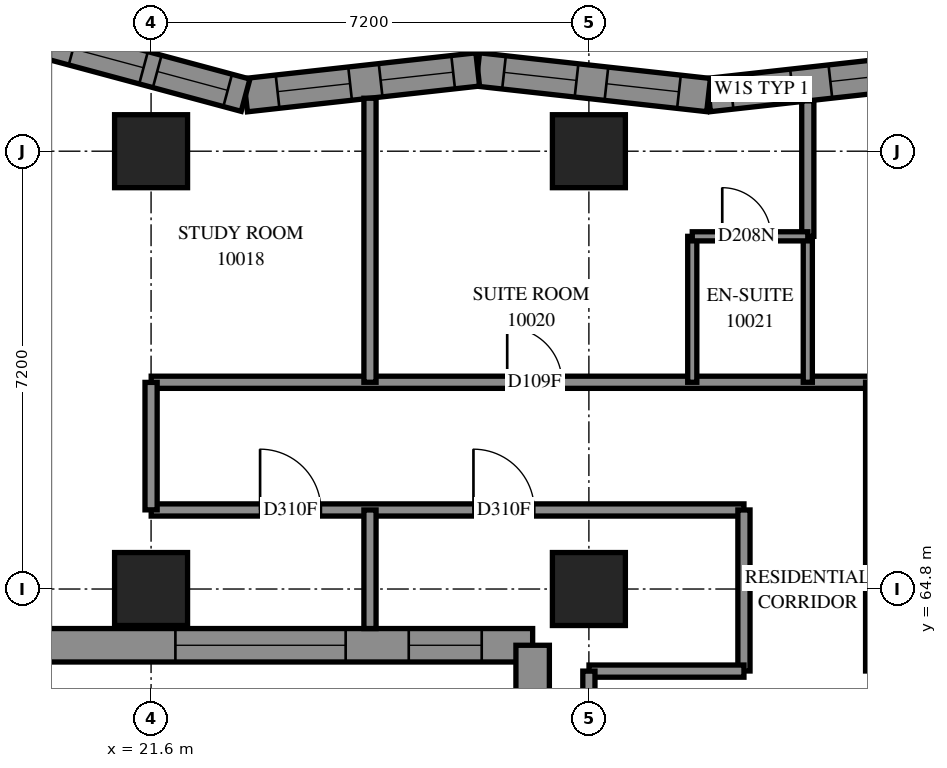
"""IFC4 building model, lengths in metres.
Left out: names, types, materials, properties, quantities, classifications, styles, units other than length and angle.
Written with IfcOpenShell. Run it as: python <this file> out.ifc"""

import sys

from ifc_helpers import new_model, si_unit, direction, frame, frame_2d, origin, origin_2d, place, context, subcontext, project, spatial, polyline, rectangle, outline, extrude, element, fill, save


model = new_model("IFC4")
c1 = context("Model", 3, precision=1e-05, world=origin(), true_north=direction((0.0, 1.0)))
c2 = subcontext(c1, "Body", "Model", "MODEL_VIEW")
j1 = project(units=[si_unit("LENGTHUNIT", "METRE"), si_unit("PLANEANGLEUNIT", "RADIAN")], contexts=[c1])
p1 = place(None, origin())
s1 = spatial("IfcSite", under=j1, at=p1, CompositionType="ELEMENT")
p2 = place(p1, origin())
s2 = spatial("IfcBuilding", under=s1, at=p2, CompositionType="ELEMENT")
p3 = place(p2, frame((0.0, 0.0, 40.6)))
s3 = spatial("IfcBuildingStorey", under=s2, at=p3, CompositionType="ELEMENT", Elevation=40.6)
for number, where, z_axis, x_axis in (
    (1, (21.6, 64.8, 0.0), (0.0, 0.0, 1.0), (1.0, 0.0, 0.0)),
    (2, (21.6, 72.0, 0.0), (0.0, 0.0, 1.0), (1.0, 0.0, 0.0)),
    (3, (28.8, 64.8, 0.0), (0.0, 0.0, 1.0), (1.0, 0.0, 0.0)),
    (4, (28.8, 72.0, 0.0), (0.0, 0.0, 1.0), (1.0, 0.0, 0.0)),
):
    element("IfcColumn", number, at=place(p3, frame(where, z_axis=z_axis, x_axis=x_axis)), inside=s3, PredefinedType="COLUMN", context=c2, shape_type="SweptSolid", body=[
        extrude(rectangle(XDim=1.2, YDim=1.2, at=origin_2d()), origin(), (0.0, 0.0, 1.0), 3.1),
    ])
p4 = place(p3, frame((34.564, 73.344, 0.0), z_axis=(0.0, 0.0, 1.0), x_axis=(-0.993907338, -0.1102188888, 0.0)))
e5 = element("IfcWall", 5, at=p4, inside=s3, PredefinedType="SOLIDWALL", context=c2, shape_type="SweptSolid", body=[
    extrude(outline(polyline([(-0.03, -0.275), (3.789, -0.275), (3.85, 0.275), (0.03, 0.275), (-0.03, -0.275)])), origin(), (0.0, 0.0, 1.0), 3.1),
])
p5 = place(p4, frame((0.604, 0.0, 0.5)))
e6 = element("IfcOpeningElement", 6, at=p5, cuts=e5, PredefinedType="OPENING", context=c2, shape_type="SweptSolid", body=[
    extrude(rectangle(XDim=1.2, YDim=2.45, at=frame_2d((0.6, 1.225))), frame((0.0, 0.285, 0.0), z_axis=(0.0, -1.0, 0.0), x_axis=(1.0, 0.0, 0.0)), (0.0, 0.0, 1.0), 0.57),
])
p6 = place(p4, frame((2.439, 0.0, 0.45)))
e7 = element("IfcOpeningElement", 7, at=p6, cuts=e5, PredefinedType="OPENING", context=c2, shape_type="SweptSolid", body=[
    extrude(rectangle(XDim=1.0, YDim=2.5, at=frame_2d((0.5, 1.25))), frame((0.0, 0.285, 0.0), z_axis=(0.0, -1.0, 0.0), x_axis=(1.0, 0.0, 0.0)), (0.0, 0.0, 1.0), 0.57),
])
p7 = place(p3, frame((30.768, 72.923, 0.0), z_axis=(0.0, 0.0, 1.0), x_axis=(-0.99390702, 0.1102217568, 0.0)))
e8 = element("IfcWall", 8, at=p7, inside=s3, PredefinedType="SOLIDWALL", context=c2, shape_type="SweptSolid", body=[
    extrude(outline(polyline([(0.03, -0.275), (3.85, -0.275), (3.789, 0.275), (-0.03, 0.275), (0.03, -0.275)])), origin(), (0.0, 0.0, 1.0), 3.1),
])
p8 = place(p7, frame((0.49, 0.0, 0.5)))
e9 = element("IfcOpeningElement", 9, at=p8, cuts=e8, PredefinedType="OPENING", context=c2, shape_type="SweptSolid", body=[
    extrude(rectangle(XDim=1.2, YDim=2.45, at=frame_2d((0.6, 1.225))), frame((0.0, 0.285, 0.0), z_axis=(0.0, -1.0, 0.0), x_axis=(1.0, 0.0, 0.0)), (0.0, 0.0, 1.0), 0.57),
])
p9 = place(p7, frame((2.184, 0.0, 0.5)))
e10 = element("IfcOpeningElement", 10, at=p9, cuts=e8, PredefinedType="OPENING", context=c2, shape_type="SweptSolid", body=[
    extrude(rectangle(XDim=1.2, YDim=2.45, at=frame_2d((0.6, 1.225))), frame((0.0, 0.285, 0.0), z_axis=(0.0, -1.0, 0.0), x_axis=(1.0, 0.0, 0.0)), (0.0, 0.0, 1.0), 0.57),
])
p10 = place(p3, frame((26.972, 73.344, 0.0), z_axis=(0.0, 0.0, 1.0), x_axis=(-0.9939087915, -0.1102057815, 0.0)))
e11 = element("IfcWall", 11, at=p10, inside=s3, PredefinedType="SOLIDWALL", context=c2, shape_type="SweptSolid", body=[
    extrude(outline(polyline([(-0.03, -0.275), (3.789, -0.275), (3.893, 0.275), (0.03, 0.275), (-0.03, -0.275)])), origin(), (0.0, 0.0, 1.0), 3.1),
])
p11 = place(p10, frame((0.406, 0.0, 0.5)))
e12 = element("IfcOpeningElement", 12, at=p11, cuts=e11, PredefinedType="OPENING", context=c2, shape_type="SweptSolid", body=[
    extrude(rectangle(XDim=1.2, YDim=2.45, at=frame_2d((0.6, 1.225))), frame((0.0, 0.285, 0.0), z_axis=(0.0, -1.0, 0.0), x_axis=(1.0, 0.0, 0.0)), (0.0, 0.0, 1.0), 0.57),
])
p12 = place(p10, frame((2.112, 0.0, 0.5)))
e13 = element("IfcOpeningElement", 13, at=p12, cuts=e11, PredefinedType="OPENING", context=c2, shape_type="SweptSolid", body=[
    extrude(rectangle(XDim=1.2, YDim=2.45, at=frame_2d((0.6, 1.225))), frame((0.0, 0.285, 0.0), z_axis=(0.0, -1.0, 0.0), x_axis=(1.0, 0.0, 0.0)), (0.0, 0.0, 1.0), 0.57),
])
p13 = place(p3, frame((23.154, 72.921, 0.0), z_axis=(0.0, 0.0, 1.0), x_axis=(-0.9656855195, 0.2597142227, 0.0)))
e14 = element("IfcWall", 14, at=p13, inside=s3, PredefinedType="SOLIDWALL", context=c2, shape_type="SweptSolid", body=[
    extrude(outline(polyline([(0.052, -0.275), (3.983, -0.275), (3.266, 0.275), (-0.052, 0.275), (0.052, -0.275)])), origin(), (0.0, 0.0, 1.0), 3.1),
])
p14 = place(p13, frame((0.305, 0.0, 0.5)))
e15 = element("IfcOpeningElement", 15, at=p14, cuts=e14, PredefinedType="OPENING", context=c2, shape_type="SweptSolid", body=[
    extrude(rectangle(XDim=1.2, YDim=2.45, at=frame_2d((0.6, 1.225))), frame((0.0, 0.285, 0.0), z_axis=(0.0, -1.0, 0.0), x_axis=(1.0, 0.0, 0.0)), (0.0, 0.0, 1.0), 0.57),
])
p15 = place(p13, frame((1.738, 0.0, 0.5)))
e16 = element("IfcOpeningElement", 16, at=p15, cuts=e14, PredefinedType="OPENING", context=c2, shape_type="SweptSolid", body=[
    extrude(rectangle(XDim=1.2, YDim=2.45, at=frame_2d((0.6, 1.225))), frame((0.0, 0.285, 0.0), z_axis=(0.0, -1.0, 0.0), x_axis=(1.0, 0.0, 0.0)), (0.0, 0.0, 1.0), 0.57),
])
p16 = place(p3, frame((19.654, 63.875, 0.0), z_axis=(0.0, 0.0, 1.0), x_axis=(1.0, 0.0, 0.0)))
e17 = element("IfcWall", 17, at=p16, inside=s3, PredefinedType="SOLIDWALL", context=c2, shape_type="SweptSolid", body=[
    extrude(outline(polyline([(-0.275, -0.275), (7.946, -0.275), (8.496, 0.275), (0.275, 0.275), (-0.275, -0.275)])), origin(), (0.0, 0.0, 1.0), 3.1),
])
p17 = place(p16, frame((2.346, 0.0, 0.5)))
e18 = element("IfcOpeningElement", 18, at=p17, cuts=e17, PredefinedType="OPENING", context=c2, shape_type="SweptSolid", body=[
    extrude(rectangle(XDim=2.8, YDim=2.45, at=frame_2d((1.4, 1.225))), frame((0.0, 0.285, 0.0), z_axis=(0.0, -1.0, 0.0), x_axis=(1.0, 0.0, 0.0)), (0.0, 0.0, 1.0), 0.57),
])
p18 = place(p16, frame((6.184, 0.0, 0.5)))
e19 = element("IfcOpeningElement", 19, at=p18, cuts=e17, PredefinedType="OPENING", context=c2, shape_type="SweptSolid", body=[
    extrude(rectangle(XDim=1.2, YDim=2.45, at=frame_2d((0.6, 1.225))), frame((0.0, 0.285, 0.0), z_axis=(0.0, -1.0, 0.0), x_axis=(1.0, 0.0, 0.0)), (0.0, 0.0, 1.0), 0.57),
])
p19 = place(p3, frame((27.875, 63.875, 0.0), z_axis=(0.0, 0.0, 1.0), x_axis=(0.0, -1.0, 0.0)))
e20 = element("IfcWall", 20, at=p19, inside=s3, PredefinedType="SOLIDWALL", context=c2, shape_type="SweptSolid", body=[
    extrude(outline(polyline([(0.275, -0.275), (7.475, -0.275), (6.925, 0.275), (-0.275, 0.275), (0.275, -0.275)])), origin(), (0.0, 0.0, 1.0), 3.1),
])
p20 = place(p19, frame((0.838, 0.0, 0.5)))
e21 = element("IfcOpeningElement", 21, at=p20, cuts=e20, PredefinedType="OPENING", context=c2, shape_type="SweptSolid", body=[
    extrude(rectangle(XDim=1.2, YDim=2.45, at=frame_2d((0.6, 1.225))), frame((0.0, 0.285, 0.0), z_axis=(0.0, -1.0, 0.0), x_axis=(1.0, 0.0, 0.0)), (0.0, 0.0, 1.0), 0.57),
])
p21 = place(p19, frame((3.3, 0.0, 0.45)))
e22 = element("IfcOpeningElement", 22, at=p21, cuts=e20, PredefinedType="OPENING", context=c2, shape_type="SweptSolid", body=[
    extrude(rectangle(XDim=1.3, YDim=2.5, at=frame_2d((0.65, 1.25))), frame((0.0, 0.285, 0.0), z_axis=(0.0, -1.0, 0.0), x_axis=(1.0, 0.0, 0.0)), (0.0, 0.0, 1.0), 0.57),
])
p22 = place(p19, frame((5.05, 0.0, 0.45)))
e23 = element("IfcOpeningElement", 23, at=p22, cuts=e20, PredefinedType="OPENING", context=c2, shape_type="SweptSolid", body=[
    extrude(rectangle(XDim=0.8, YDim=2.5, at=frame_2d((0.4, 1.25))), frame((0.0, 0.285, 0.0), z_axis=(0.0, -1.0, 0.0), x_axis=(1.0, 0.0, 0.0)), (0.0, 0.0, 1.0), 0.57),
])
p23 = place(p3, frame((21.602, 68.2, 0.0), z_axis=(0.0, 0.0, 1.0), x_axis=(1.0, 0.0, 0.0)))
e24 = element("IfcWall", 24, at=p23, inside=s3, PredefinedType="PARTITIONING", context=c2, shape_type="SweptSolid", body=[
    extrude(rectangle(XDim=11.848, YDim=0.2, at=frame_2d((5.924, 0.0))), origin(), (0.0, 0.0, 1.0), 3.1),
])
p24 = place(p23, frame((5.855, 0.0, 0.0)))
e25 = element("IfcOpeningElement", 25, at=p24, cuts=e24, PredefinedType="OPENING", context=c2, shape_type="SweptSolid", body=[
    extrude(rectangle(XDim=0.9, YDim=2.1, at=frame_2d((0.45, 1.05))), frame((0.0, 0.11, 0.0), z_axis=(0.0, -1.0, 0.0), x_axis=(1.0, 0.0, 0.0)), (0.0, 0.0, 1.0), 0.22),
])
p25 = place(p3, frame((21.602, 66.1, 0.0), z_axis=(0.0, 0.0, 1.0), x_axis=(1.0, 0.0, 0.0)))
e26 = element("IfcWall", 26, at=p25, inside=s3, PredefinedType="PARTITIONING", context=c2, shape_type="SweptSolid", body=[
    extrude(rectangle(XDim=9.748, YDim=0.2, at=frame_2d((4.874, 0.0))), origin(), (0.0, 0.0, 1.0), 3.1),
])
p26 = place(p25, frame((1.791, 0.0, 0.0)))
e27 = element("IfcOpeningElement", 27, at=p26, cuts=e26, PredefinedType="OPENING", context=c2, shape_type="SweptSolid", body=[
    extrude(rectangle(XDim=1.0, YDim=2.1, at=frame_2d((0.5, 1.05))), frame((0.0, 0.11, 0.0), z_axis=(0.0, -1.0, 0.0), x_axis=(1.0, 0.0, 0.0)), (0.0, 0.0, 1.0), 0.22),
])
p27 = place(p25, frame((5.3, 0.0, 0.0)))
e28 = element("IfcOpeningElement", 28, at=p27, cuts=e26, PredefinedType="OPENING", context=c2, shape_type="SweptSolid", body=[
    extrude(rectangle(XDim=1.0, YDim=2.1, at=frame_2d((0.5, 1.05))), frame((0.0, 0.11, 0.0), z_axis=(0.0, -1.0, 0.0), x_axis=(1.0, 0.0, 0.0)), (0.0, 0.0, 1.0), 0.22),
])
p28 = place(p3, frame((33.45, 63.452, 0.0), z_axis=(0.0, 0.0, 1.0), x_axis=(0.0, 1.0, 0.0)))
e29 = element("IfcWall", 29, at=p28, inside=s3, PredefinedType="PARTITIONING", context=c2, shape_type="SweptSolid", body=[
    extrude(rectangle(XDim=4.748, YDim=0.2, at=frame_2d((2.374, 0.0))), origin(), (0.0, 0.0, 1.0), 3.1),
])
p29 = place(p3, frame((25.2, 68.2, 0.0), z_axis=(0.0, 0.0, 1.0), x_axis=(0.0, 1.0, 0.0)))
e30 = element("IfcWall", 30, at=p29, inside=s3, PredefinedType="PARTITIONING", context=c2, shape_type="SweptSolid", body=[
    extrude(rectangle(XDim=4.671, YDim=0.2, at=frame_2d((2.336, 0.0))), origin(), (0.0, 0.0, 1.0), 3.1),
])
p30 = place(p3, frame((31.35, 63.452, 0.0), z_axis=(0.0, 0.0, 1.0), x_axis=(0.0, 1.0, 0.0)))
e31 = element("IfcWall", 31, at=p30, inside=s3, PredefinedType="PARTITIONING", context=c2, shape_type="SweptSolid", body=[
    extrude(rectangle(XDim=2.648, YDim=0.2, at=frame_2d((1.324, 0.0))), origin(), (0.0, 0.0, 1.0), 3.1),
])
p31 = place(p3, frame((28.802, 63.45, 0.0), z_axis=(0.0, 0.0, 1.0), x_axis=(1.0, 0.0, 0.0)))
e32 = element("IfcWall", 32, at=p31, inside=s3, PredefinedType="PARTITIONING", context=c2, shape_type="SweptSolid", body=[
    extrude(rectangle(XDim=2.548, YDim=0.2, at=frame_2d((1.274, 0.0))), origin(), (0.0, 0.0, 1.0), 3.1),
])
for number, where, z_axis, x_axis in (
    (33, (30.5, 68.2, 0.0), (0.0, 0.0, 1.0), (0.0, 1.0, 0.0)),
    (34, (32.4, 68.2, 0.0), (0.0, 0.0, 1.0), (0.0, 1.0, 0.0)),
):
    element("IfcWall", number, at=place(p3, frame(where, z_axis=z_axis, x_axis=x_axis)), inside=s3, PredefinedType="PARTITIONING", context=c2, shape_type="SweptSolid", body=[
        extrude(rectangle(XDim=2.4, YDim=0.15, at=frame_2d((1.2, 0.0))), origin(), (0.0, 0.0, 1.0), 3.1),
    ])
p32 = place(p3, frame((32.4, 70.6, 0.0), z_axis=(0.0, 0.0, 1.0), x_axis=(0.0, 1.0, 0.0)))
e35 = element("IfcWall", 35, at=p32, inside=s3, PredefinedType="PARTITIONING", context=c2, shape_type="SweptSolid", body=[
    extrude(rectangle(XDim=2.228, YDim=0.2, at=frame_2d((1.114, 0.0))), origin(), (0.0, 0.0, 1.0), 3.1),
])
p33 = place(p3, frame((28.8, 61.35, 0.0), z_axis=(0.0, 0.0, 1.0), x_axis=(0.0, 1.0, 0.0)))
e36 = element("IfcWall", 36, at=p33, inside=s3, PredefinedType="PARTITIONING", context=c2, shape_type="SweptSolid", body=[
    extrude(rectangle(XDim=2.1, YDim=0.2, at=frame_2d((1.05, 0.0))), origin(), (0.0, 0.0, 1.0), 2.6),
])
p34 = place(p3, frame((21.6, 66.102, 0.0), z_axis=(0.0, 0.0, 1.0), x_axis=(0.0, 1.0, 0.0)))
e37 = element("IfcWall", 37, at=p34, inside=s3, PredefinedType="PARTITIONING", context=c2, shape_type="SweptSolid", body=[
    extrude(rectangle(XDim=2.096, YDim=0.2, at=frame_2d((1.048, 0.0))), origin(), (0.0, 0.0, 1.0), 2.6),
])
p35 = place(p3, frame((30.5, 70.6, 0.0), z_axis=(0.0, 0.0, 1.0), x_axis=(1.0, 0.0, 0.0)))
e38 = element("IfcWall", 38, at=p35, inside=s3, PredefinedType="PARTITIONING", context=c2, shape_type="SweptSolid", body=[
    extrude(rectangle(XDim=1.9, YDim=0.15, at=frame_2d((0.95, 0.0))), origin(), (0.0, 0.0, 1.0), 3.1),
])
p36 = place(p35, frame((0.493, 0.0, 0.0)))
e39 = element("IfcOpeningElement", 39, at=p36, cuts=e38, PredefinedType="OPENING", context=c2, shape_type="SweptSolid", body=[
    extrude(rectangle(XDim=0.8, YDim=2.1, at=frame_2d((0.4, 1.05))), frame((0.0, 0.085, 0.0), z_axis=(0.0, -1.0, 0.0), x_axis=(1.0, 0.0, 0.0)), (0.0, 0.0, 1.0), 0.17),
])
p37 = place(p3, frame((25.2, 64.15, 0.0), z_axis=(0.0, 0.0, 1.0), x_axis=(0.0, 1.0, 0.0)))
e40 = element("IfcWall", 40, at=p37, inside=s3, PredefinedType="PARTITIONING", context=c2, shape_type="SweptSolid", body=[
    extrude(rectangle(XDim=1.95, YDim=0.2, at=frame_2d((0.975, 0.0))), origin(), (0.0, 0.0, 1.0), 3.1),
])
p38 = place(p5, origin())
e41 = element("IfcWindow", 41, at=p38, inside=s3, PartitioningType="SINGLE_PANEL", PredefinedType="WINDOW", context=c2, shape_type="SweptSolid", body=[
    extrude(rectangle(XDim=1.2, YDim=2.45, at=frame_2d((0.6, 1.225))), frame((0.0, 0.155, 0.0), z_axis=(0.0, -1.0, 0.0), x_axis=(1.0, 0.0, 0.0)), (0.0, 0.0, 1.0), 0.06),
])
fill(e6, e41)
p39 = place(p8, origin())
e42 = element("IfcWindow", 42, at=p39, inside=s3, PartitioningType="SINGLE_PANEL", PredefinedType="WINDOW", context=c2, shape_type="SweptSolid", body=[
    extrude(rectangle(XDim=1.2, YDim=2.45, at=frame_2d((0.6, 1.225))), frame((0.0, 0.155, 0.0), z_axis=(0.0, -1.0, 0.0), x_axis=(1.0, 0.0, 0.0)), (0.0, 0.0, 1.0), 0.06),
])
fill(e9, e42)
p40 = place(p9, origin())
e43 = element("IfcWindow", 43, at=p40, inside=s3, PartitioningType="SINGLE_PANEL", PredefinedType="WINDOW", context=c2, shape_type="SweptSolid", body=[
    extrude(rectangle(XDim=1.2, YDim=2.45, at=frame_2d((0.6, 1.225))), frame((0.0, 0.155, 0.0), z_axis=(0.0, -1.0, 0.0), x_axis=(1.0, 0.0, 0.0)), (0.0, 0.0, 1.0), 0.06),
])
fill(e10, e43)
p41 = place(p11, origin())
e44 = element("IfcWindow", 44, at=p41, inside=s3, PartitioningType="SINGLE_PANEL", PredefinedType="WINDOW", context=c2, shape_type="SweptSolid", body=[
    extrude(rectangle(XDim=1.2, YDim=2.45, at=frame_2d((0.6, 1.225))), frame((0.0, 0.155, 0.0), z_axis=(0.0, -1.0, 0.0), x_axis=(1.0, 0.0, 0.0)), (0.0, 0.0, 1.0), 0.06),
])
fill(e12, e44)
p42 = place(p12, origin())
e45 = element("IfcWindow", 45, at=p42, inside=s3, PartitioningType="SINGLE_PANEL", PredefinedType="WINDOW", context=c2, shape_type="SweptSolid", body=[
    extrude(rectangle(XDim=1.2, YDim=2.45, at=frame_2d((0.6, 1.225))), frame((0.0, 0.155, 0.0), z_axis=(0.0, -1.0, 0.0), x_axis=(1.0, 0.0, 0.0)), (0.0, 0.0, 1.0), 0.06),
])
fill(e13, e45)
p43 = place(p14, origin())
e46 = element("IfcWindow", 46, at=p43, inside=s3, PartitioningType="SINGLE_PANEL", PredefinedType="WINDOW", context=c2, shape_type="SweptSolid", body=[
    extrude(rectangle(XDim=1.2, YDim=2.45, at=frame_2d((0.6, 1.225))), frame((0.0, 0.155, 0.0), z_axis=(0.0, -1.0, 0.0), x_axis=(1.0, 0.0, 0.0)), (0.0, 0.0, 1.0), 0.06),
])
fill(e15, e46)
p44 = place(p15, origin())
e47 = element("IfcWindow", 47, at=p44, inside=s3, PartitioningType="SINGLE_PANEL", PredefinedType="WINDOW", context=c2, shape_type="SweptSolid", body=[
    extrude(rectangle(XDim=1.2, YDim=2.45, at=frame_2d((0.6, 1.225))), frame((0.0, 0.155, 0.0), z_axis=(0.0, -1.0, 0.0), x_axis=(1.0, 0.0, 0.0)), (0.0, 0.0, 1.0), 0.06),
])
fill(e16, e47)
p45 = place(p17, origin())
e48 = element("IfcWindow", 48, at=p45, inside=s3, PartitioningType="SINGLE_PANEL", PredefinedType="WINDOW", context=c2, shape_type="SweptSolid", body=[
    extrude(rectangle(XDim=2.8, YDim=2.45, at=frame_2d((1.4, 1.225))), frame((0.0, 0.155, 0.0), z_axis=(0.0, -1.0, 0.0), x_axis=(1.0, 0.0, 0.0)), (0.0, 0.0, 1.0), 0.06),
])
fill(e18, e48)
p46 = place(p18, origin())
e49 = element("IfcWindow", 49, at=p46, inside=s3, PartitioningType="SINGLE_PANEL", PredefinedType="WINDOW", context=c2, shape_type="SweptSolid", body=[
    extrude(rectangle(XDim=1.2, YDim=2.45, at=frame_2d((0.6, 1.225))), frame((0.0, 0.155, 0.0), z_axis=(0.0, -1.0, 0.0), x_axis=(1.0, 0.0, 0.0)), (0.0, 0.0, 1.0), 0.06),
])
fill(e19, e49)
p47 = place(p26, origin())
e50 = element("IfcDoor", 50, at=p47, inside=s3, OperationType="SINGLE_SWING_RIGHT", PredefinedType="DOOR", context=c2, shape_type="SweptSolid", body=[
    extrude(rectangle(XDim=1.0, YDim=2.1, at=frame_2d((0.5, 1.05))), frame((0.0, 0.025, 0.0), z_axis=(0.0, -1.0, 0.0), x_axis=(1.0, 0.0, 0.0)), (0.0, 0.0, 1.0), 0.05),
])
fill(e27, e50)
p48 = place(p27, origin())
e51 = element("IfcDoor", 51, at=p48, inside=s3, OperationType="SINGLE_SWING_RIGHT", PredefinedType="DOOR", context=c2, shape_type="SweptSolid", body=[
    extrude(rectangle(XDim=1.0, YDim=2.1, at=frame_2d((0.5, 1.05))), frame((0.0, 0.025, 0.0), z_axis=(0.0, -1.0, 0.0), x_axis=(1.0, 0.0, 0.0)), (0.0, 0.0, 1.0), 0.05),
])
fill(e28, e51)
p49 = place(p24, origin())
e52 = element("IfcDoor", 52, at=p49, inside=s3, OperationType="SINGLE_SWING_LEFT", PredefinedType="DOOR", context=c2, shape_type="SweptSolid", body=[
    extrude(rectangle(XDim=0.9, YDim=2.1, at=frame_2d((0.45, 1.05))), frame((0.0, 0.025, 0.0), z_axis=(0.0, -1.0, 0.0), x_axis=(1.0, 0.0, 0.0)), (0.0, 0.0, 1.0), 0.05),
])
fill(e25, e52)
p50 = place(p36, origin())
e53 = element("IfcDoor", 53, at=p50, inside=s3, OperationType="SINGLE_SWING_RIGHT", PredefinedType="DOOR", context=c2, shape_type="SweptSolid", body=[
    extrude(rectangle(XDim=0.8, YDim=2.1, at=frame_2d((0.4, 1.05))), frame((0.0, 0.025, 0.0), z_axis=(0.0, -1.0, 0.0), x_axis=(1.0, 0.0, 0.0)), (0.0, 0.0, 1.0), 0.05),
])
fill(e39, e53)
p51 = place(p6, origin())
e54 = element("IfcWindow", 54, at=p51, inside=s3, PartitioningType="SINGLE_PANEL", PredefinedType="WINDOW", context=c2, shape_type="SweptSolid", body=[
    extrude(rectangle(XDim=1.0, YDim=2.5, at=frame_2d((0.5, 1.25))), frame((0.0, 0.155, 0.0), z_axis=(0.0, -1.0, 0.0), x_axis=(1.0, 0.0, 0.0)), (0.0, 0.0, 1.0), 0.06),
])
fill(e7, e54)
save(model, sys.argv[1])
